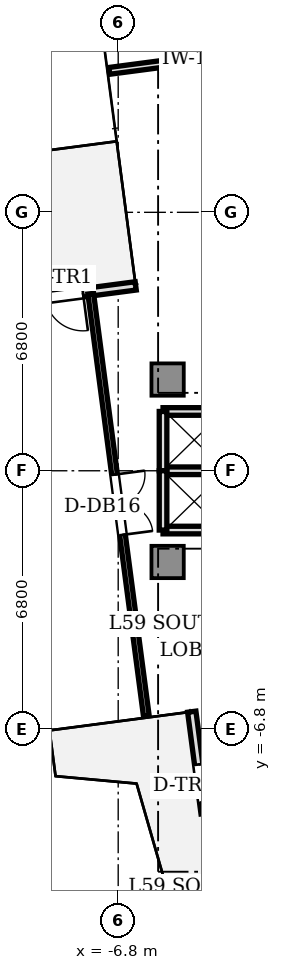
"""IFC4 building model, lengths in metres.
Left out: names, types, materials, properties, quantities, classifications, styles, units other than length and angle.
Written with IfcOpenShell. Run it as: python <this file> out.ifc"""

import sys

from ifc_helpers import new_model, si_unit, direction, frame, frame_2d, origin, origin_2d, place, context, subcontext, project, spatial, rectangle, extrude, source, transform, mapped, element, fill, save


model = new_model("IFC4")
c1 = context("Model", 3, precision=1e-05, world=origin(), true_north=direction((0.0, 1.0)))
c2 = subcontext(c1, "Body", "Model", "MODEL_VIEW")
j1 = project(units=[si_unit("LENGTHUNIT", "METRE"), si_unit("PLANEANGLEUNIT", "RADIAN")], contexts=[c1])
p1 = place(None, origin())
s1 = spatial("IfcSite", under=j1, at=p1, CompositionType="ELEMENT")
p2 = place(p1, origin())
s2 = spatial("IfcBuilding", under=s1, at=p2, CompositionType="ELEMENT")
p3 = place(p2, frame((0.0, 0.0, 213.2)))
s3 = spatial("IfcBuildingStorey", under=s2, at=p3, CompositionType="ELEMENT", Elevation=213.2)
m1 = source(origin(), c2, "Body", "SweptSolid", [
    extrude(rectangle(XDim=0.85, YDim=0.85, at=origin_2d()), origin(), (0.0, 0.0, 1.0), 3.11),
])
for number, where, z_axis, x_axis in (
    (1, (-5.5, 2.4, 0.0), (0.0, 0.0, 1.0), (1.0, 0.0, 0.0)),
    (2, (-5.5, -2.4, 0.0), (0.0, 0.0, 1.0), (1.0, 0.0, 0.0)),
):
    element("IfcColumn", number, at=place(p3, frame(where, z_axis=z_axis, x_axis=x_axis)), inside=s3, PredefinedType="COLUMN", context=c2, shape_type="MappedRepresentation", body=[
        mapped(m1, transform((0.0, 0.0, 0.0), scale=1.0)),
    ])
p4 = place(p3, frame((-6.339, 4.864, 0.0), z_axis=(0.0, 0.0, 1.0), x_axis=(-0.991439824936, -0.130564442062, 0.0)))
e3 = element("IfcWall", 3, at=p4, inside=s3, PredefinedType="STANDARD", context=c2, shape_type="SweptSolid", body=[
    extrude(rectangle(XDim=2.7, YDim=0.22, at=frame_2d((1.35, 0.0))), origin(), (0.0, 0.0, 1.0), 3.11),
])
p5 = place(p4, frame((1.4, 0.0, 0.0)))
e4 = element("IfcOpeningElement", 4, at=p5, cuts=e3, PredefinedType="OPENING", context=c2, shape_type="SweptSolid", body=[
    extrude(rectangle(XDim=1.0, YDim=2.2, at=frame_2d((0.5, 1.1))), frame((0.0, 0.12, 0.0), z_axis=(0.0, -1.0, 0.0), x_axis=(1.0, 0.0, 0.0)), (0.0, 0.0, 1.0), 0.24),
])
p6 = place(p3, frame((-4.864, -6.339, 0.0), z_axis=(0.0, 0.0, 1.0), x_axis=(0.130564442062, -0.991439824936, 0.0)))
e5 = element("IfcWall", 5, at=p6, inside=s3, PredefinedType="STANDARD", context=c2, shape_type="SweptSolid", body=[
    extrude(rectangle(XDim=2.7, YDim=0.22, at=frame_2d((1.35, 0.0))), origin(), (0.0, 0.0, 1.0), 3.11),
])
p7 = place(p6, frame((1.4, 0.0, 0.0)))
e6 = element("IfcOpeningElement", 6, at=p7, cuts=e5, PredefinedType="OPENING", context=c2, shape_type="SweptSolid", body=[
    extrude(rectangle(XDim=1.0, YDim=2.2, at=frame_2d((0.5, 1.1))), frame((0.0, 0.12, 0.0), z_axis=(0.0, -1.0, 0.0), x_axis=(1.0, 0.0, 0.0)), (0.0, 0.0, 1.0), 0.24),
])
for number, where, z_axis, x_axis in (
    (7, (-5.62, 1.56, 0.0), (0.0, 0.0, 1.0), (1.0, 0.0, 0.0)),
    (8, (-5.62, -1.56, 0.0), (0.0, 0.0, 1.0), (1.0, 0.0, 0.0)),
    (9, (-5.62, 0.0, 0.0), (0.0, 0.0, 1.0), (1.0, 0.0, 0.0)),
):
    element("IfcWall", number, at=place(p3, frame(where, z_axis=z_axis, x_axis=x_axis)), inside=s3, PredefinedType="SOLIDWALL", context=c2, shape_type="SweptSolid", body=[
        extrude(rectangle(XDim=1.64, YDim=0.2, at=frame_2d((0.82, 0.0))), origin(), (0.0, 0.0, 1.0), 2.66),
    ])
for number, where, z_axis, x_axis in (
    (10, (-5.62, 0.0, 0.0), (0.0, 0.0, 1.0), (0.0, 1.0, 0.0)),
    (11, (-5.62, -1.56, 0.0), (0.0, 0.0, 1.0), (0.0, 1.0, 0.0)),
):
    element("IfcWall", number, at=place(p3, frame(where, z_axis=z_axis, x_axis=x_axis)), inside=s3, PredefinedType="SOLIDWALL", context=c2, shape_type="SweptSolid", body=[
        extrude(rectangle(XDim=1.56, YDim=0.2, at=frame_2d((0.78, 0.0))), origin(), (0.0, 0.0, 1.0), 2.66),
    ])
p8 = place(p3, frame((-2.423, 11.129, 0.0), z_axis=(0.0, 0.0, 1.0), x_axis=(-0.991445715827, -0.13051970184, 0.0)))
e12 = element("IfcWall", 12, at=p8, inside=s3, PredefinedType="PARTITIONING", context=c2, shape_type="SweptSolid", body=[
    extrude(rectangle(XDim=4.65, YDim=0.18, at=frame_2d((2.325, 0.0))), origin(), (0.0, 0.0, 1.0), 2.66),
])
p9 = place(p3, frame((-7.522, 4.658, 0.0), z_axis=(0.0, 0.0, 1.0), x_axis=(0.130505824974, -0.99144754256, 0.0)))
e13 = element("IfcWall", 13, at=p9, inside=s3, PredefinedType="PARTITIONING", context=c2, shape_type="SweptSolid", body=[
    extrude(rectangle(XDim=11.2, YDim=0.15, at=frame_2d((5.6, 0.0))), origin(), (0.0, 0.0, 1.0), 2.66),
])
p10 = place(p9, frame((4.8, 0.0, 0.0)))
e14 = element("IfcOpeningElement", 14, at=p10, cuts=e13, PredefinedType="OPENING", context=c2, shape_type="SweptSolid", body=[
    extrude(rectangle(XDim=1.6, YDim=2.25, at=frame_2d((0.8, 1.125))), frame((0.0, 0.085, 0.0), z_axis=(0.0, -1.0, 0.0), x_axis=(1.0, 0.0, 0.0)), (0.0, 0.0, 1.0), 0.17),
])
m2 = source(origin(), c2, "Body", "SweptSolid", [
    extrude(rectangle(XDim=1.0, YDim=0.05, at=origin_2d()), origin(), (0.0, 0.0, 1.0), 2.2),
])
p11 = place(p5, frame((0.5, 0.0, 0.0)))
e15 = element("IfcDoor", 15, at=p11, inside=s3, OperationType="SINGLE_SWING_LEFT", PredefinedType="DOOR", context=c2, shape_type="MappedRepresentation", body=[
    mapped(m2, transform((0.0, 0.0, 0.0), scale=1.0)),
])
fill(e4, e15)
p12 = place(p7, frame((0.5, 0.0, 0.0)))
e16 = element("IfcDoor", 16, at=p12, inside=s3, OperationType="SINGLE_SWING_LEFT", PredefinedType="DOOR", context=c2, shape_type="MappedRepresentation", body=[
    mapped(m2, transform((0.0, 0.0, 0.0), scale=1.0)),
])
fill(e6, e16)
m3 = source(origin(), c2, "Body", "SweptSolid", [
    extrude(rectangle(XDim=1.6, YDim=0.05, at=origin_2d()), origin(), (0.0, 0.0, 1.0), 2.25),
])
p13 = place(p10, frame((0.8, 0.0, 0.0)))
e17 = element("IfcDoor", 17, at=p13, inside=s3, OperationType="DOUBLE_DOOR_SINGLE_SWING", PredefinedType="DOOR", context=c2, shape_type="MappedRepresentation", body=[
    mapped(m3, transform((0.0, 0.0, 0.0), scale=1.0)),
])
fill(e14, e17)
save(model, sys.argv[1])
